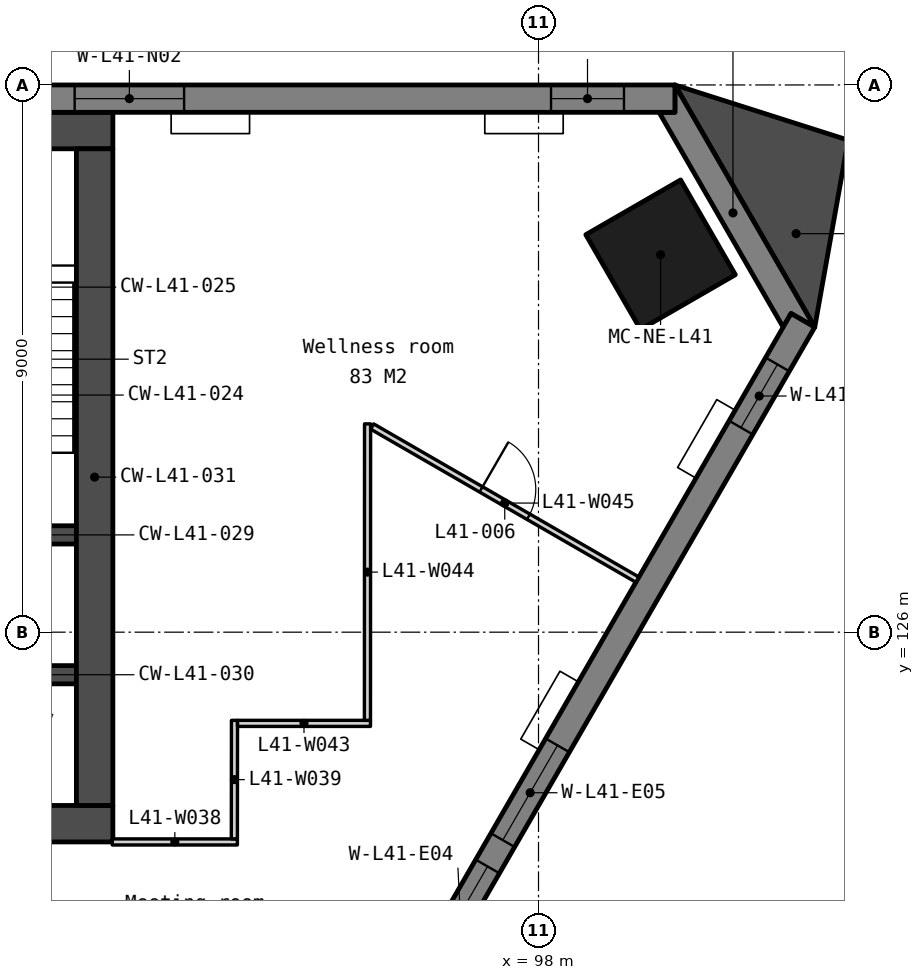
"""IFC4 building model, lengths in metres.
Left out: names, types, materials, properties, quantities, classifications, styles, units other than length and angle.
Written with IfcOpenShell. Run it as: python <this file> out.ifc"""

import sys

from ifc_helpers import new_model, si_unit, direction, frame, frame_2d, origin, origin_2d, place, context, subcontext, project, spatial, polyline, rectangle, outline, extrude, element, fill, save


model = new_model("IFC4")
c1 = context("Model", 3, precision=1e-05, world=origin(), true_north=direction((0.0, 1.0)))
c2 = subcontext(c1, "Body", "Model", "MODEL_VIEW")
j1 = project(units=[si_unit("LENGTHUNIT", "METRE"), si_unit("PLANEANGLEUNIT", "RADIAN")], contexts=[c1])
p1 = place(None, origin())
s1 = spatial("IfcSite", under=j1, at=p1, CompositionType="ELEMENT")
p2 = place(p1, origin())
s2 = spatial("IfcBuilding", under=s1, at=p2, CompositionType="ELEMENT")
p3 = place(p2, frame((0.0, 0.0, 163.7)))
s3 = spatial("IfcBuildingStorey", under=s2, at=p3, CompositionType="ELEMENT", Elevation=163.7)
p4 = place(p3, frame((100.007, 132.208, 0.0), z_axis=(0.0, 0.0, 1.0), x_axis=(-0.5, 0.866025403784, 0.0)))
e1 = element("IfcColumn", 1, at=p4, inside=s3, PredefinedType="COLUMN", context=c2, shape_type="SweptSolid", body=[
    extrude(rectangle(XDim=1.8, YDim=1.8, at=origin_2d()), origin(), (0.0, 0.0, 1.0), 3.9),
])
p5 = place(p3, frame((69.0, 134.25, 0.0), z_axis=(0.0, 0.0, 1.0), x_axis=(1.0, 0.0, 0.0)))
e2 = element("IfcWall", 2, at=p5, inside=s3, PredefinedType="SOLIDWALL", context=c2, shape_type="SweptSolid", body=[
    extrude(rectangle(XDim=22.0, YDim=0.6, at=frame_2d((11.0, 0.0))), origin(), (0.0, 0.0, 1.0), 3.75),
])
p6 = place(p3, frame((69.0, 122.85, 0.0), z_axis=(0.0, 0.0, 1.0), x_axis=(1.0, 0.0, 0.0)))
e3 = element("IfcWall", 3, at=p6, inside=s3, PredefinedType="SOLIDWALL", context=c2, shape_type="SweptSolid", body=[
    extrude(rectangle(XDim=22.0, YDim=0.6, at=frame_2d((11.0, 0.0))), origin(), (0.0, 0.0, 1.0), 3.75),
])
p7 = place(p6, frame((16.375, 0.0, 0.0)))
e4 = element("IfcOpeningElement", 4, at=p7, cuts=e3, PredefinedType="OPENING", context=c2, shape_type="SweptSolid", body=[
    extrude(rectangle(XDim=1.8, YDim=2.1, at=frame_2d((0.9, 1.05))), frame((0.0, 0.31, 0.0), z_axis=(0.0, -1.0, 0.0), x_axis=(1.0, 0.0, 0.0)), (0.0, 0.0, 1.0), 0.62),
])
p8 = place(p6, frame((3.825, 0.0, 0.0)))
e5 = element("IfcOpeningElement", 5, at=p8, cuts=e3, PredefinedType="OPENING", context=c2, shape_type="SweptSolid", body=[
    extrude(rectangle(XDim=1.8, YDim=2.1, at=frame_2d((0.9, 1.05))), frame((0.0, 0.31, 0.0), z_axis=(0.0, -1.0, 0.0), x_axis=(1.0, 0.0, 0.0)), (0.0, 0.0, 1.0), 0.62),
])
p9 = place(p6, frame((12.85, 0.0, 0.0)))
e6 = element("IfcOpeningElement", 6, at=p9, cuts=e3, PredefinedType="OPENING", context=c2, shape_type="SweptSolid", body=[
    extrude(rectangle(XDim=1.5, YDim=2.1, at=frame_2d((0.75, 1.05))), frame((0.0, 0.31, 0.0), z_axis=(0.0, -1.0, 0.0), x_axis=(1.0, 0.0, 0.0)), (0.0, 0.0, 1.0), 0.62),
])
for number, where, z_axis, x_axis in (
    (7, (87.85, 127.6, 0.0), (0.0, 0.0, 1.0), (1.0, 0.0, 0.0)),
    (8, (87.85, 125.3, 0.0), (0.0, 0.0, 1.0), (1.0, 0.0, 0.0)),
):
    element("IfcWall", number, at=place(p3, frame(where, z_axis=z_axis, x_axis=x_axis)), inside=s3, PredefinedType="SOLIDWALL", context=c2, shape_type="SweptSolid", body=[
        extrude(rectangle(XDim=2.55, YDim=0.3, at=frame_2d((1.275, 0.0))), origin(), (0.0, 0.0, 1.0), 3.75),
    ])
p10 = place(p3, frame((90.7, 133.95, 0.0), z_axis=(0.0, 0.0, 1.0), x_axis=(0.0, -1.0, 0.0)))
e9 = element("IfcWall", 9, at=p10, inside=s3, PredefinedType="SOLIDWALL", context=c2, shape_type="SweptSolid", body=[
    extrude(rectangle(XDim=10.8, YDim=0.6, at=frame_2d((5.4, 0.0))), origin(), (0.0, 0.0, 1.0), 3.75),
])
p11 = place(p3, frame((0.0, 0.0, -0.15)))
e10 = element("IfcWall", 10, at=p11, inside=s3, PredefinedType="SOLIDWALL", context=c2, shape_type="SweptSolid", body=[
    extrude(outline(polyline([(102.543, 131.016), (102.153, 131.241), (102.023, 131.016), (99.983, 134.55), (100.243, 134.55), (100.243, 135.0), (102.543, 131.016)])), origin(), (0.0, 0.0, 1.0), 3.9),
])
p12 = place(p3, frame((100.243, 134.775, -0.15), z_axis=(0.0, 0.0, 1.0), x_axis=(-1.0, 0.0, 0.0)))
e11 = element("IfcWall", 11, at=p12, inside=s3, PredefinedType="SOLIDWALL", context=c2, shape_type="SweptSolid", body=[
    extrude(outline(polyline([(40.486, 0.0), (40.486, 3.9), (0.0, 3.9), (0.0, 0.0), (40.486, 0.0)])), frame((0.0, 0.225, 0.0), z_axis=(0.0, -1.0, 0.0), x_axis=(1.0, 0.0, 0.0)), (0.0, 0.0, 1.0), 0.45),
])
p13 = place(p12, frame((0.837, 0.0, 0.95)))
e12 = element("IfcOpeningElement", 12, at=p13, cuts=e11, PredefinedType="OPENING", context=c2, shape_type="SweptSolid", body=[
    extrude(rectangle(XDim=1.2, YDim=2.2, at=frame_2d((0.6, 1.1))), frame((0.0, 0.235, 0.0), z_axis=(0.0, -1.0, 0.0), x_axis=(1.0, 0.0, 0.0)), (0.0, 0.0, 1.0), 0.47),
])
p14 = place(p12, frame((8.072, 0.0, 0.95)))
e13 = element("IfcOpeningElement", 13, at=p14, cuts=e11, PredefinedType="OPENING", context=c2, shape_type="SweptSolid", body=[
    extrude(rectangle(XDim=1.8, YDim=2.2, at=frame_2d((0.9, 1.1))), frame((0.0, 0.235, 0.0), z_axis=(0.0, -1.0, 0.0), x_axis=(1.0, 0.0, 0.0)), (0.0, 0.0, 1.0), 0.47),
])
p15 = place(p12, frame((10.372, 0.0, 0.95)))
e14 = element("IfcOpeningElement", 14, at=p15, cuts=e11, PredefinedType="OPENING", context=c2, shape_type="SweptSolid", body=[
    extrude(rectangle(XDim=1.8, YDim=2.2, at=frame_2d((0.9, 1.1))), frame((0.0, 0.235, 0.0), z_axis=(0.0, -1.0, 0.0), x_axis=(1.0, 0.0, 0.0)), (0.0, 0.0, 1.0), 0.47),
])
p16 = place(p12, frame((18.193, 0.0, 0.95)))
e15 = element("IfcOpeningElement", 15, at=p16, cuts=e11, PredefinedType="OPENING", context=c2, shape_type="SweptSolid", body=[
    extrude(rectangle(XDim=1.8, YDim=2.2, at=frame_2d((0.9, 1.1))), frame((0.0, 0.235, 0.0), z_axis=(0.0, -1.0, 0.0), x_axis=(1.0, 0.0, 0.0)), (0.0, 0.0, 1.0), 0.47),
])
p17 = place(p12, frame((20.493, 0.0, 0.95)))
e16 = element("IfcOpeningElement", 16, at=p17, cuts=e11, PredefinedType="OPENING", context=c2, shape_type="SweptSolid", body=[
    extrude(rectangle(XDim=1.8, YDim=2.2, at=frame_2d((0.9, 1.1))), frame((0.0, 0.235, 0.0), z_axis=(0.0, -1.0, 0.0), x_axis=(1.0, 0.0, 0.0)), (0.0, 0.0, 1.0), 0.47),
])
p18 = place(p12, frame((28.315, 0.0, 0.95)))
e17 = element("IfcOpeningElement", 17, at=p18, cuts=e11, PredefinedType="OPENING", context=c2, shape_type="SweptSolid", body=[
    extrude(rectangle(XDim=1.8, YDim=2.2, at=frame_2d((0.9, 1.1))), frame((0.0, 0.235, 0.0), z_axis=(0.0, -1.0, 0.0), x_axis=(1.0, 0.0, 0.0)), (0.0, 0.0, 1.0), 0.47),
])
p19 = place(p12, frame((30.615, 0.0, 0.95)))
e18 = element("IfcOpeningElement", 18, at=p19, cuts=e11, PredefinedType="OPENING", context=c2, shape_type="SweptSolid", body=[
    extrude(rectangle(XDim=1.8, YDim=2.2, at=frame_2d((0.9, 1.1))), frame((0.0, 0.235, 0.0), z_axis=(0.0, -1.0, 0.0), x_axis=(1.0, 0.0, 0.0)), (0.0, 0.0, 1.0), 0.47),
])
p20 = place(p12, frame((38.449, 0.0, 0.95)))
e19 = element("IfcOpeningElement", 19, at=p20, cuts=e11, PredefinedType="OPENING", context=c2, shape_type="SweptSolid", body=[
    extrude(rectangle(XDim=1.2, YDim=2.2, at=frame_2d((0.6, 1.1))), frame((0.0, 0.235, 0.0), z_axis=(0.0, -1.0, 0.0), x_axis=(1.0, 0.0, 0.0)), (0.0, 0.0, 1.0), 0.47),
])
p21 = place(p3, frame((88.166, 106.564, -0.15), z_axis=(0.0, 0.0, 1.0), x_axis=(0.499995644604, 0.866027918359, 0.0)))
e20 = element("IfcWall", 20, at=p21, inside=s3, PredefinedType="SOLIDWALL", context=c2, shape_type="SweptSolid", body=[
    extrude(outline(polyline([(28.365, 3.9), (28.365, 0.0), (0.0, 0.0), (0.0, 3.9), (28.365, 3.9)])), frame((0.0, 0.225, 0.0), z_axis=(0.0, -1.0, 0.0), x_axis=(1.0, 0.0, 0.0)), (0.0, 0.0, 1.0), 0.45),
])
p22 = place(p21, frame((6.072, 0.0, 0.95)))
e21 = element("IfcOpeningElement", 21, at=p22, cuts=e20, PredefinedType="OPENING", context=c2, shape_type="SweptSolid", body=[
    extrude(rectangle(XDim=1.8, YDim=2.2, at=frame_2d((0.9, 1.1))), frame((0.0, 0.235, 0.0), z_axis=(0.0, -1.0, 0.0), x_axis=(1.0, 0.0, 0.0)), (0.0, 0.0, 1.0), 0.47),
])
p23 = place(p21, frame((8.372, 0.0, 0.95)))
e22 = element("IfcOpeningElement", 22, at=p23, cuts=e20, PredefinedType="OPENING", context=c2, shape_type="SweptSolid", body=[
    extrude(rectangle(XDim=1.8, YDim=2.2, at=frame_2d((0.9, 1.1))), frame((0.0, 0.235, 0.0), z_axis=(0.0, -1.0, 0.0), x_axis=(1.0, 0.0, 0.0)), (0.0, 0.0, 1.0), 0.47),
])
p24 = place(p21, frame((16.193, 0.0, 0.95)))
e23 = element("IfcOpeningElement", 23, at=p24, cuts=e20, PredefinedType="OPENING", context=c2, shape_type="SweptSolid", body=[
    extrude(rectangle(XDim=1.8, YDim=2.2, at=frame_2d((0.9, 1.1))), frame((0.0, 0.235, 0.0), z_axis=(0.0, -1.0, 0.0), x_axis=(1.0, 0.0, 0.0)), (0.0, 0.0, 1.0), 0.47),
])
p25 = place(p21, frame((18.493, 0.0, 0.95)))
e24 = element("IfcOpeningElement", 24, at=p25, cuts=e20, PredefinedType="OPENING", context=c2, shape_type="SweptSolid", body=[
    extrude(rectangle(XDim=1.8, YDim=2.2, at=frame_2d((0.9, 1.1))), frame((0.0, 0.235, 0.0), z_axis=(0.0, -1.0, 0.0), x_axis=(1.0, 0.0, 0.0)), (0.0, 0.0, 1.0), 0.47),
])
p26 = place(p21, frame((26.327, 0.0, 0.95)))
e25 = element("IfcOpeningElement", 25, at=p26, cuts=e20, PredefinedType="OPENING", context=c2, shape_type="SweptSolid", body=[
    extrude(rectangle(XDim=1.2, YDim=2.2, at=frame_2d((0.6, 1.1))), frame((0.0, 0.235, 0.0), z_axis=(0.0, -1.0, 0.0), x_axis=(1.0, 0.0, 0.0)), (0.0, 0.0, 1.0), 0.47),
])
p27 = place(p3, frame((0.0, 0.0, -0.15)))
e26 = element("IfcWall", 26, at=p27, inside=s3, PredefinedType="SOLIDWALL", context=c2, shape_type="SweptSolid", body=[
    extrude(outline(polyline([(102.543, 131.016), (103.092, 134.093), (100.243, 135.0), (102.543, 131.016)])), origin(), (0.0, 0.0, 1.0), 3.9),
])
p28 = place(p3, frame((90.99, 122.55, 0.0), z_axis=(0.0, 0.0, 1.0), x_axis=(1.0, 0.0, 0.0)))
e27 = element("IfcWall", 27, at=p28, inside=s3, PredefinedType="PARTITIONING", context=c2, shape_type="SweptSolid", body=[
    extrude(rectangle(XDim=2.058, YDim=0.1, at=frame_2d((1.029, 0.0))), origin(), (0.0, 0.0, 1.0), 3.75),
])
p29 = place(p3, frame((92.998, 122.6, 0.0), z_axis=(0.0, 0.0, 1.0), x_axis=(0.001001752565, 0.999999498246, 0.0)))
e28 = element("IfcWall", 28, at=p29, inside=s3, PredefinedType="PARTITIONING", context=c2, shape_type="SweptSolid", body=[
    extrude(rectangle(XDim=1.95, YDim=0.1, at=frame_2d((0.975, 0.0))), origin(), (0.0, 0.0, 1.0), 3.75),
])
p30 = place(p3, frame((93.05, 124.5, 0.0), z_axis=(0.0, 0.0, 1.0), x_axis=(1.0, 0.0, 0.0)))
e29 = element("IfcWall", 29, at=p30, inside=s3, PredefinedType="PARTITIONING", context=c2, shape_type="SweptSolid", body=[
    extrude(rectangle(XDim=2.187, YDim=0.1, at=frame_2d((1.093, 0.0))), origin(), (0.0, 0.0, 1.0), 3.75),
])
p31 = place(p3, frame((95.187, 124.55, 0.0), z_axis=(0.0, 0.0, 1.0), x_axis=(0.000450630837, 0.999999898466, 0.0)))
e30 = element("IfcWall", 30, at=p31, inside=s3, PredefinedType="PARTITIONING", context=c2, shape_type="SweptSolid", body=[
    extrude(rectangle(XDim=4.876, YDim=0.1, at=frame_2d((2.438, 0.0))), origin(), (0.0, 0.0, 1.0), 3.75),
])
p32 = place(p3, frame((95.264, 129.383, 0.0), z_axis=(0.0, 0.0, 1.0), x_axis=(0.866027389382, -0.499996560828, 0.0)))
e31 = element("IfcWall", 31, at=p32, inside=s3, PredefinedType="PARTITIONING", context=c2, shape_type="SweptSolid", body=[
    extrude(rectangle(XDim=5.037, YDim=0.1, at=frame_2d((2.519, 0.0))), origin(), (0.0, 0.0, 1.0), 3.75),
])
p33 = place(p32, frame((2.069, 0.0, 0.0)))
e32 = element("IfcOpeningElement", 32, at=p33, cuts=e31, PredefinedType="OPENING", context=c2, shape_type="SweptSolid", body=[
    extrude(rectangle(XDim=0.9, YDim=2.1, at=frame_2d((0.45, 1.05))), frame((0.0, 0.06, 0.0), z_axis=(0.0, -1.0, 0.0), x_axis=(1.0, 0.0, 0.0)), (0.0, 0.0, 1.0), 0.12),
])
p34 = place(p13, origin())
e33 = element("IfcWindow", 33, at=p34, inside=s3, PartitioningType="SINGLE_PANEL", PredefinedType="WINDOW", context=c2, shape_type="SweptSolid", body=[
    extrude(rectangle(XDim=1.2, YDim=2.2, at=frame_2d((0.6, 1.1))), frame((0.0, 0.03, 0.0), z_axis=(0.0, -1.0, 0.0), x_axis=(1.0, 0.0, 0.0)), (0.0, 0.0, 1.0), 0.06),
])
fill(e12, e33)
p35 = place(p14, origin())
e34 = element("IfcWindow", 34, at=p35, inside=s3, PartitioningType="SINGLE_PANEL", PredefinedType="WINDOW", context=c2, shape_type="SweptSolid", body=[
    extrude(rectangle(XDim=1.8, YDim=2.2, at=frame_2d((0.9, 1.1))), frame((0.0, 0.03, 0.0), z_axis=(0.0, -1.0, 0.0), x_axis=(1.0, 0.0, 0.0)), (0.0, 0.0, 1.0), 0.06),
])
fill(e13, e34)
p36 = place(p24, origin())
e35 = element("IfcWindow", 35, at=p36, inside=s3, PartitioningType="SINGLE_PANEL", PredefinedType="WINDOW", context=c2, shape_type="SweptSolid", body=[
    extrude(rectangle(XDim=1.8, YDim=2.2, at=frame_2d((0.9, 1.1))), frame((0.0, 0.03, 0.0), z_axis=(0.0, -1.0, 0.0), x_axis=(1.0, 0.0, 0.0)), (0.0, 0.0, 1.0), 0.06),
])
fill(e23, e35)
p37 = place(p25, origin())
e36 = element("IfcWindow", 36, at=p37, inside=s3, PartitioningType="SINGLE_PANEL", PredefinedType="WINDOW", context=c2, shape_type="SweptSolid", body=[
    extrude(rectangle(XDim=1.8, YDim=2.2, at=frame_2d((0.9, 1.1))), frame((0.0, 0.03, 0.0), z_axis=(0.0, -1.0, 0.0), x_axis=(1.0, 0.0, 0.0)), (0.0, 0.0, 1.0), 0.06),
])
fill(e24, e36)
p38 = place(p26, origin())
e37 = element("IfcWindow", 37, at=p38, inside=s3, PartitioningType="SINGLE_PANEL", PredefinedType="WINDOW", context=c2, shape_type="SweptSolid", body=[
    extrude(rectangle(XDim=1.2, YDim=2.2, at=frame_2d((0.6, 1.1))), frame((0.0, 0.03, 0.0), z_axis=(0.0, -1.0, 0.0), x_axis=(1.0, 0.0, 0.0)), (0.0, 0.0, 1.0), 0.06),
])
fill(e25, e37)
p39 = place(p33, origin())
e38 = element("IfcDoor", 38, at=p39, inside=s3, OperationType="SINGLE_SWING_LEFT", PredefinedType="DOOR", context=c2, shape_type="SweptSolid", body=[
    extrude(rectangle(XDim=0.9, YDim=2.1, at=frame_2d((0.45, 1.05))), frame((0.0, 0.025, 0.0), z_axis=(0.0, -1.0, 0.0), x_axis=(1.0, 0.0, 0.0)), (0.0, 0.0, 1.0), 0.05),
])
fill(e32, e38)
save(model, sys.argv[1])
